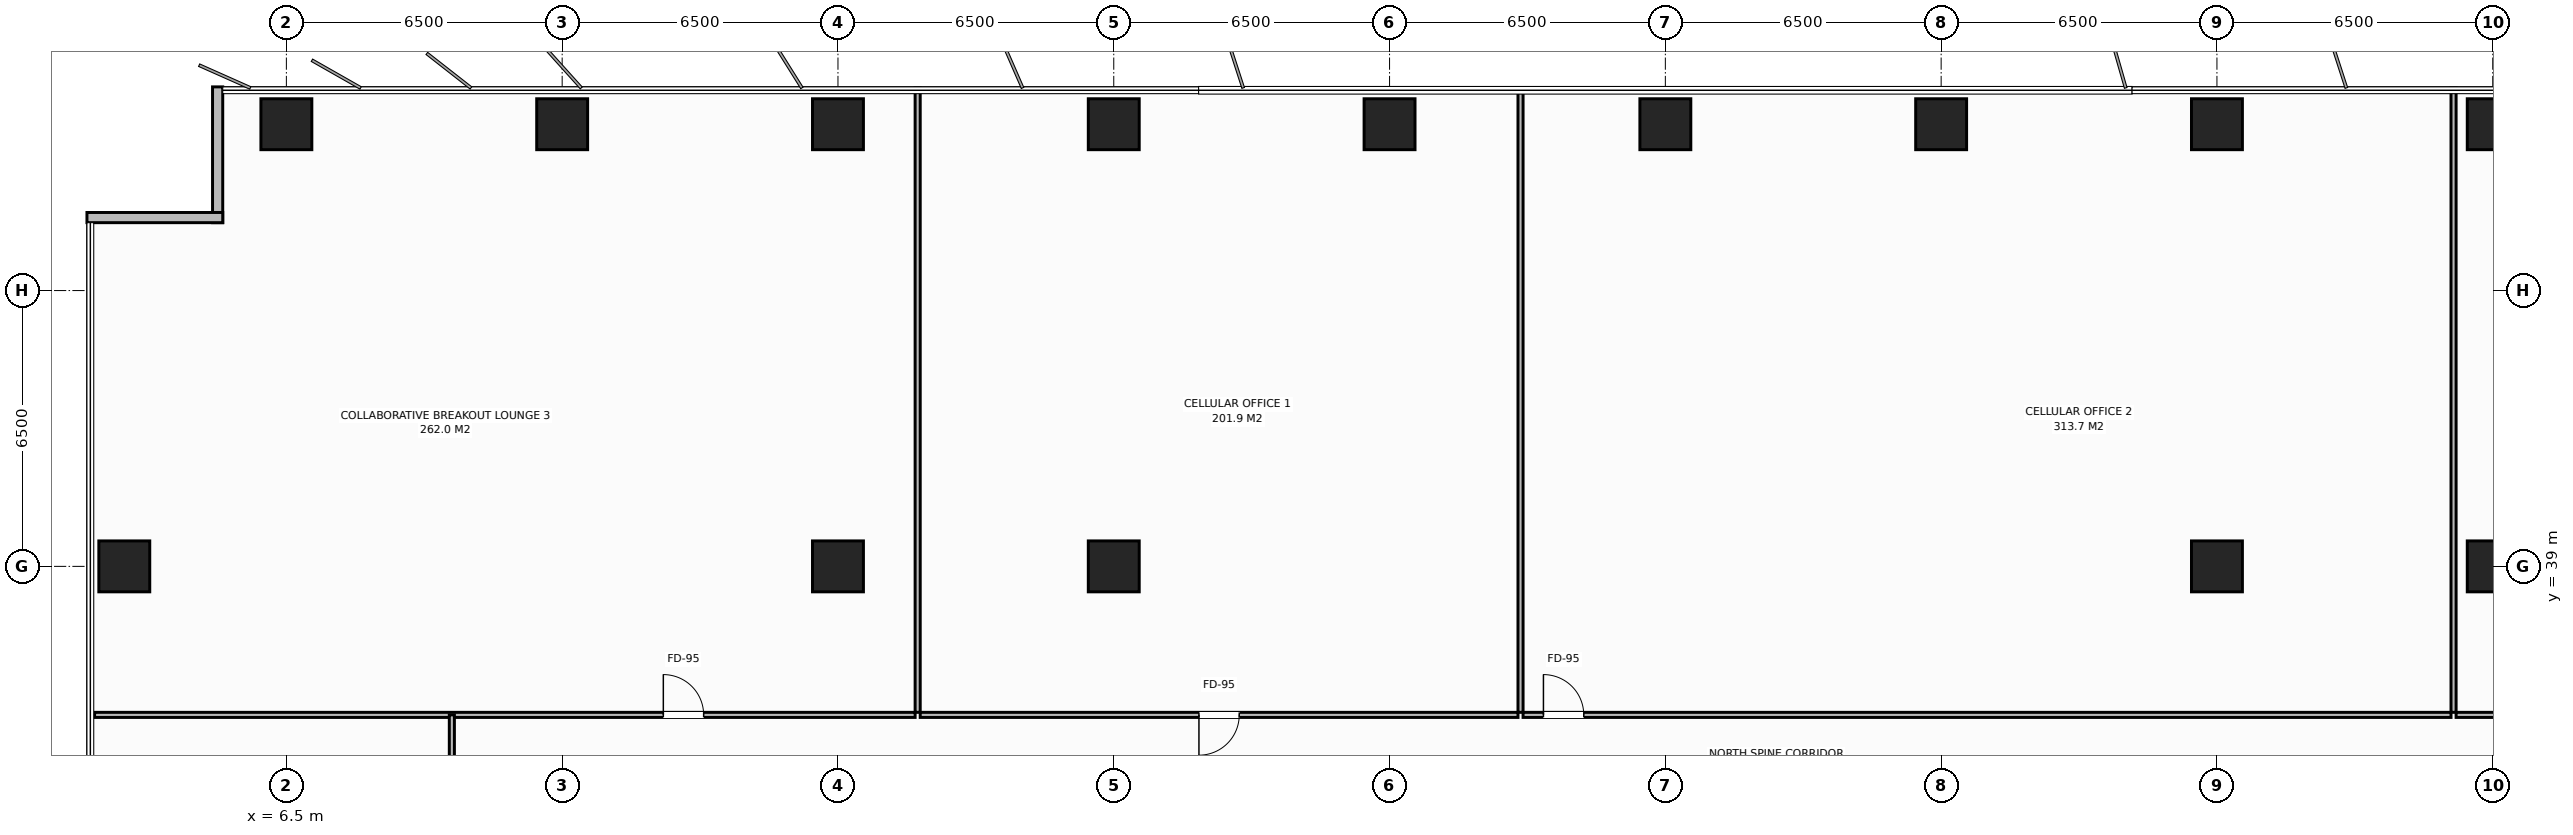
"""IFC4 building model, lengths in metres.
Left out: names, types, materials, properties, quantities, classifications, styles, units other than length and angle.
Written with IfcOpenShell. Run it as: python <this file> out.ifc"""

import sys

from ifc_helpers import new_model, si_unit, direction, frame, frame_2d, origin, origin_2d, place, context, subcontext, project, spatial, rectangle, extrude, element, fill, save


model = new_model("IFC4")
c1 = context("Model", 3, precision=1e-05, world=origin(), true_north=direction((0.0, 1.0)))
c2 = subcontext(c1, "Body", "Model", "MODEL_VIEW")
j1 = project(units=[si_unit("LENGTHUNIT", "METRE"), si_unit("PLANEANGLEUNIT", "RADIAN")], contexts=[c1])
p1 = place(None, origin())
s1 = spatial("IfcSite", under=j1, at=p1, CompositionType="ELEMENT")
p2 = place(p1, origin())
s2 = spatial("IfcBuilding", under=s1, at=p2, CompositionType="ELEMENT")
p3 = place(p2, frame((0.0, 0.0, 93.6)))
s3 = spatial("IfcBuildingStorey", under=s2, at=p3, CompositionType="ELEMENT", Elevation=93.6)
for number, where, z_axis, x_axis in (
    (1, (19.5, 39.0, 0.0), (0.0, 0.0, 1.0), (1.0, 0.0, 0.0)),
    (2, (58.5, 39.0, 0.0), (0.0, 0.0, 1.0), (1.0, 0.0, 0.0)),
    (3, (26.0, 39.0, 0.0), (0.0, 0.0, 1.0), (1.0, 0.0, 0.0)),
    (4, (52.0, 39.0, 0.0), (0.0, 0.0, 1.0), (1.0, 0.0, 0.0)),
    (5, (6.5, 49.42, 0.0), (0.0, 0.0, 1.0), (1.0, 0.0, 0.0)),
    (6, (13.0, 49.42, 0.0), (0.0, 0.0, 1.0), (1.0, 0.0, 0.0)),
    (7, (19.5, 49.42, 0.0), (0.0, 0.0, 1.0), (1.0, 0.0, 0.0)),
    (8, (26.0, 49.42, 0.0), (0.0, 0.0, 1.0), (1.0, 0.0, 0.0)),
    (9, (32.5, 49.42, 0.0), (0.0, 0.0, 1.0), (1.0, 0.0, 0.0)),
    (10, (39.0, 49.42, 0.0), (0.0, 0.0, 1.0), (1.0, 0.0, 0.0)),
    (11, (45.5, 49.42, 0.0), (0.0, 0.0, 1.0), (1.0, 0.0, 0.0)),
    (12, (52.0, 49.42, 0.0), (0.0, 0.0, 1.0), (1.0, 0.0, 0.0)),
    (13, (58.5, 49.42, 0.0), (0.0, 0.0, 1.0), (1.0, 0.0, 0.0)),
    (14, (2.68, 39.0, 0.0), (0.0, 0.0, 1.0), (1.0, 0.0, 0.0)),
):
    element("IfcColumn", number, at=place(p3, frame(where, z_axis=z_axis, x_axis=x_axis)), inside=s3, PredefinedType="COLUMN", context=c2, shape_type="SweptSolid", body=[
        extrude(rectangle(XDim=1.2, YDim=1.2, at=origin_2d()), origin(), (0.0, 0.0, 1.0), 3.8),
    ])
for number, where, z_axis, x_axis in (
    (15, (4.88, 47.1, 0.0), (0.0, 0.0, 1.0), (0.0, 1.0, 0.0)),
    (16, (1.8, 47.22, 0.0), (0.0, 0.0, 1.0), (1.0, 0.0, 0.0)),
):
    element("IfcWall", number, at=place(p3, frame(where, z_axis=z_axis, x_axis=x_axis)), inside=s3, PredefinedType="STANDARD", context=c2, shape_type="SweptSolid", body=[
        extrude(rectangle(XDim=3.2, YDim=0.24, at=frame_2d((1.6, 0.0))), origin(), (0.0, 0.0, 1.0), 3.565),
    ])
p4 = place(p3, frame((21.378, 35.56, 0.0), z_axis=(0.0, 0.0, 1.0), x_axis=(0.0, 1.0, 0.0)))
e17 = element("IfcWall", 17, at=p4, inside=s3, PredefinedType="PARTITIONING", context=c2, shape_type="SweptSolid", body=[
    extrude(rectangle(XDim=14.72, YDim=0.12, at=frame_2d((7.36, 0.0))), origin(), (0.0, 0.0, 1.0), 3.565),
])
p5 = place(p3, frame((1.98, 35.5, 0.0), z_axis=(0.0, 0.0, 1.0), x_axis=(1.0, 0.0, 0.0)))
e18 = element("IfcWall", 18, at=p5, inside=s3, PredefinedType="PARTITIONING", context=c2, shape_type="SweptSolid", body=[
    extrude(rectangle(XDim=19.339, YDim=0.12, at=frame_2d((9.669, 0.0))), origin(), (0.0, 0.0, 1.0), 3.565),
])
p6 = place(p5, frame((13.404, 0.0, 0.0)))
e19 = element("IfcOpeningElement", 19, at=p6, cuts=e18, PredefinedType="OPENING", context=c2, shape_type="SweptSolid", body=[
    extrude(rectangle(XDim=0.95, YDim=2.15, at=frame_2d((0.475, 1.075))), frame((0.0, 0.07, 0.0), z_axis=(0.0, -1.0, 0.0), x_axis=(1.0, 0.0, 0.0)), (0.0, 0.0, 1.0), 0.14),
])
p7 = place(p3, frame((35.587, 35.56, 0.0), z_axis=(0.0, 0.0, 1.0), x_axis=(0.0, 1.0, 0.0)))
e20 = element("IfcWall", 20, at=p7, inside=s3, PredefinedType="PARTITIONING", context=c2, shape_type="SweptSolid", body=[
    extrude(rectangle(XDim=14.72, YDim=0.12, at=frame_2d((7.36, 0.0))), origin(), (0.0, 0.0, 1.0), 3.565),
])
p8 = place(p3, frame((21.438, 35.5, 0.0), z_axis=(0.0, 0.0, 1.0), x_axis=(1.0, 0.0, 0.0)))
e21 = element("IfcWall", 21, at=p8, inside=s3, PredefinedType="PARTITIONING", context=c2, shape_type="SweptSolid", body=[
    extrude(rectangle(XDim=14.088, YDim=0.12, at=frame_2d((7.044, 0.0))), origin(), (0.0, 0.0, 1.0), 3.565),
])
p9 = place(p8, frame((6.569, 0.0, 0.0)))
e22 = element("IfcOpeningElement", 22, at=p9, cuts=e21, PredefinedType="OPENING", context=c2, shape_type="SweptSolid", body=[
    extrude(rectangle(XDim=0.95, YDim=2.15, at=frame_2d((0.475, 1.075))), frame((0.0, 0.07, 0.0), z_axis=(0.0, -1.0, 0.0), x_axis=(1.0, 0.0, 0.0)), (0.0, 0.0, 1.0), 0.14),
])
p10 = place(p3, frame((57.577, 35.56, 0.0), z_axis=(0.0, 0.0, 1.0), x_axis=(0.0, 1.0, 0.0)))
e23 = element("IfcWall", 23, at=p10, inside=s3, PredefinedType="PARTITIONING", context=c2, shape_type="SweptSolid", body=[
    extrude(rectangle(XDim=14.72, YDim=0.12, at=frame_2d((7.36, 0.0))), origin(), (0.0, 0.0, 1.0), 3.565),
])
p11 = place(p3, frame((35.647, 35.5, 0.0), z_axis=(0.0, 0.0, 1.0), x_axis=(1.0, 0.0, 0.0)))
e24 = element("IfcWall", 24, at=p11, inside=s3, PredefinedType="PARTITIONING", context=c2, shape_type="SweptSolid", body=[
    extrude(rectangle(XDim=21.87, YDim=0.12, at=frame_2d((10.935, 0.0))), origin(), (0.0, 0.0, 1.0), 3.565),
])
p12 = place(p11, frame((0.48, 0.0, 0.0)))
e25 = element("IfcOpeningElement", 25, at=p12, cuts=e24, PredefinedType="OPENING", context=c2, shape_type="SweptSolid", body=[
    extrude(rectangle(XDim=0.95, YDim=2.15, at=frame_2d((0.475, 1.075))), frame((0.0, 0.07, 0.0), z_axis=(0.0, -1.0, 0.0), x_axis=(1.0, 0.0, 0.0)), (0.0, 0.0, 1.0), 0.14),
])
p13 = place(p3, frame((57.637, 35.5, 0.0), z_axis=(0.0, 0.0, 1.0), x_axis=(1.0, 0.0, 0.0)))
e26 = element("IfcWall", 26, at=p13, inside=s3, PredefinedType="PARTITIONING", context=c2, shape_type="SweptSolid", body=[
    extrude(rectangle(XDim=18.383, YDim=0.12, at=frame_2d((9.192, 0.0))), origin(), (0.0, 0.0, 1.0), 3.565),
])
p14 = place(p13, frame((4.507, 0.0, 0.0)))
e27 = element("IfcOpeningElement", 27, at=p14, cuts=e26, PredefinedType="OPENING", context=c2, shape_type="SweptSolid", body=[
    extrude(rectangle(XDim=0.95, YDim=2.15, at=frame_2d((0.475, 1.075))), frame((0.0, 0.07, 0.0), z_axis=(0.0, -1.0, 0.0), x_axis=(1.0, 0.0, 0.0)), (0.0, 0.0, 1.0), 0.14),
])
p15 = place(p3, frame((10.4, 18.6, 0.0), z_axis=(0.0, 0.0, 1.0), x_axis=(0.0, 1.0, 0.0)))
e28 = element("IfcWall", 28, at=p15, inside=s3, PredefinedType="PARTITIONING", context=c2, shape_type="SweptSolid", body=[
    extrude(rectangle(XDim=16.9, YDim=0.12, at=frame_2d((8.45, 0.0))), origin(), (0.0, 0.0, 1.0), 3.565),
])
p16 = place(p15, frame((6.925, 0.0, 0.0)))
e29 = element("IfcOpeningElement", 29, at=p16, cuts=e28, PredefinedType="OPENING", context=c2, shape_type="SweptSolid", body=[
    extrude(rectangle(XDim=0.95, YDim=2.15, at=frame_2d((0.475, 1.075))), frame((0.0, 0.07, 0.0), z_axis=(0.0, -1.0, 0.0), x_axis=(1.0, 0.0, 0.0)), (0.0, 0.0, 1.0), 0.14),
])
p17 = place(p6, origin())
e30 = element("IfcDoor", 30, at=p17, inside=s3, OperationType="SINGLE_SWING_LEFT", PredefinedType="DOOR", context=c2, shape_type="SweptSolid", body=[
    extrude(rectangle(XDim=0.95, YDim=2.15, at=frame_2d((0.475, 1.075))), frame((0.0, 0.025, 0.0), z_axis=(0.0, -1.0, 0.0), x_axis=(1.0, 0.0, 0.0)), (0.0, 0.0, 1.0), 0.05),
])
fill(e19, e30)
p18 = place(p9, origin())
e31 = element("IfcDoor", 31, at=p18, inside=s3, OperationType="SINGLE_SWING_RIGHT", PredefinedType="DOOR", context=c2, shape_type="SweptSolid", body=[
    extrude(rectangle(XDim=0.95, YDim=2.15, at=frame_2d((0.475, 1.075))), frame((0.0, 0.025, 0.0), z_axis=(0.0, -1.0, 0.0), x_axis=(1.0, 0.0, 0.0)), (0.0, 0.0, 1.0), 0.05),
])
fill(e22, e31)
p19 = place(p12, origin())
e32 = element("IfcDoor", 32, at=p19, inside=s3, OperationType="SINGLE_SWING_LEFT", PredefinedType="DOOR", context=c2, shape_type="SweptSolid", body=[
    extrude(rectangle(XDim=0.95, YDim=2.15, at=frame_2d((0.475, 1.075))), frame((0.0, 0.025, 0.0), z_axis=(0.0, -1.0, 0.0), x_axis=(1.0, 0.0, 0.0)), (0.0, 0.0, 1.0), 0.05),
])
fill(e25, e32)
save(model, sys.argv[1])
